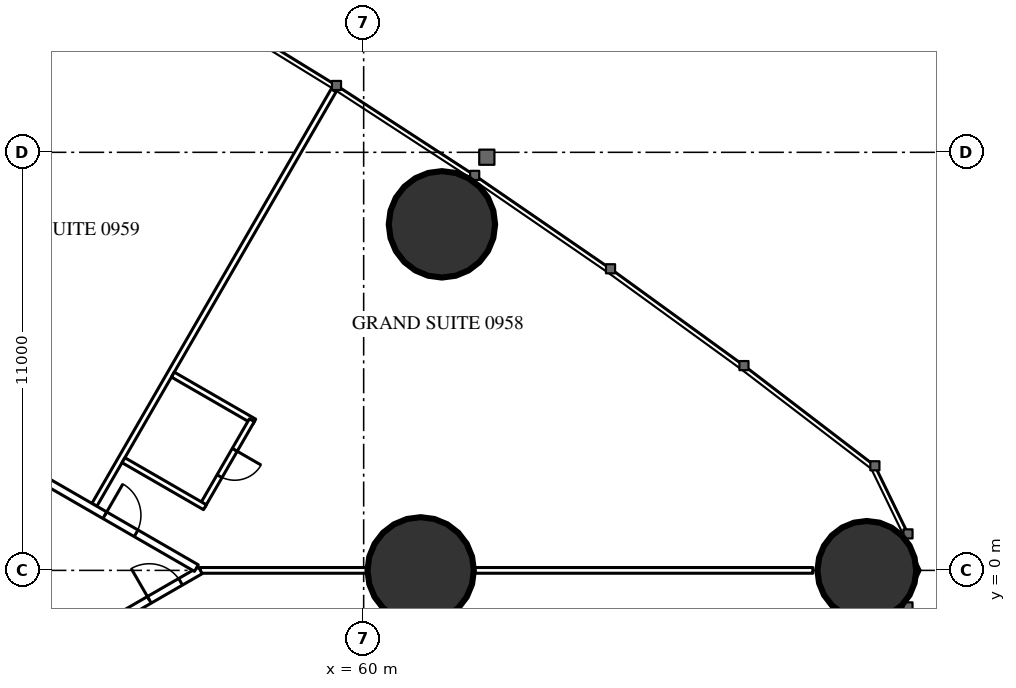
"""IFC4 building model, lengths in metres.
Left out: names, types, materials, properties, quantities, classifications, styles, units other than length and angle.
Written with IfcOpenShell. Run it as: python <this file> out.ifc"""

import sys

from ifc_helpers import new_model, si_unit, direction, frame, frame_2d, origin, origin_2d, place, context, subcontext, project, spatial, rectangle, hollow_circle, extrude, element, fill, save


model = new_model("IFC4")
c1 = context("Model", 3, precision=1e-05, world=origin(), true_north=direction((0.0, 1.0)))
c2 = subcontext(c1, "Body", "Model", "MODEL_VIEW")
j1 = project(units=[si_unit("LENGTHUNIT", "METRE"), si_unit("PLANEANGLEUNIT", "RADIAN")], contexts=[c1])
p1 = place(None, origin())
s1 = spatial("IfcSite", under=j1, at=p1, CompositionType="ELEMENT")
p2 = place(p1, origin())
s2 = spatial("IfcBuilding", under=s1, at=p2, CompositionType="ELEMENT")
p3 = place(p2, frame((0.0, 0.0, 39.0)))
s3 = spatial("IfcBuildingStorey", under=s2, at=p3, CompositionType="ELEMENT", Elevation=39.0)
p4 = place(p3, frame((73.239, 0.0, 0.0), z_axis=(0.0, 0.0, 1.0), x_axis=(1.0, 0.0, 0.0)))
e1 = element("IfcColumn", 1, at=p4, inside=s3, PredefinedType="COLUMN", context=c2, shape_type="SweptSolid", body=[
    extrude(hollow_circle(Radius=1.3, WallThickness=0.1, at=origin_2d()), origin(), (0.0, 0.0, 1.0), 3.5),
])
p5 = place(p3, frame((62.059, 9.105, 0.0), z_axis=(0.0, 0.0, 1.0), x_axis=(1.0, 0.0, 0.0)))
e2 = element("IfcColumn", 2, at=p5, inside=s3, PredefinedType="COLUMN", context=c2, shape_type="SweptSolid", body=[
    extrude(hollow_circle(Radius=1.4, WallThickness=0.12, at=origin_2d()), origin(), (0.0, 0.0, 1.0), 3.5),
])
p6 = place(p3, frame((61.5, 0.0, 0.0), z_axis=(0.0, 0.0, 1.0), x_axis=(1.0, 0.0, 0.0)))
e3 = element("IfcColumn", 3, at=p6, inside=s3, PredefinedType="COLUMN", context=c2, shape_type="SweptSolid", body=[
    extrude(hollow_circle(Radius=1.4, WallThickness=0.1, at=origin_2d()), origin(), (0.0, 0.0, 1.0), 3.5),
])
p7 = place(p3, frame((52.915, 1.725, 0.0), z_axis=(0.0, 0.0, 1.0), x_axis=(0.499997163113, 0.866027041656, 0.0)))
e4 = element("IfcWall", 4, at=p7, inside=s3, PredefinedType="PARTITIONING", context=c2, shape_type="SweptSolid", body=[
    extrude(rectangle(XDim=12.591, YDim=0.15, at=frame_2d((6.295, 0.0))), origin(), (0.0, 0.0, 1.0), 3.25),
])
p8 = place(p3, frame((55.702, 0.0, 0.0), z_axis=(0.0, 0.0, 1.0), x_axis=(1.0, 0.0, 0.0)))
e5 = element("IfcWall", 5, at=p8, inside=s3, PredefinedType="PARTITIONING", context=c2, shape_type="SweptSolid", body=[
    extrude(rectangle(XDim=16.117, YDim=0.15, at=frame_2d((8.059, 0.0))), origin(), (0.0, 0.0, 1.0), 2.25),
])
p9 = place(p3, frame((37.96, -10.243, 0.0), z_axis=(0.0, 0.0, 1.0), x_axis=(0.866026429433, 0.499998223521, 0.0)))
e6 = element("IfcWall", 6, at=p9, inside=s3, PredefinedType="PARTITIONING", context=c2, shape_type="SweptSolid", body=[
    extrude(rectangle(XDim=20.487, YDim=0.2, at=frame_2d((10.243, 0.0))), origin(), (0.0, 0.0, 1.0), 3.25),
])
p10 = place(p9, frame((7.325, 0.0, 0.0)))
e7 = element("IfcOpeningElement", 7, at=p10, cuts=e6, PredefinedType="OPENING", context=c2, shape_type="SweptSolid", body=[
    extrude(rectangle(XDim=1.0, YDim=2.2, at=frame_2d((0.5, 1.1))), frame((0.0, 0.11, 0.0), z_axis=(0.0, -1.0, 0.0), x_axis=(1.0, 0.0, 0.0)), (0.0, 0.0, 1.0), 0.22),
])
p11 = place(p9, frame((18.937, 0.0, 0.0)))
e8 = element("IfcOpeningElement", 8, at=p11, cuts=e6, PredefinedType="OPENING", context=c2, shape_type="SweptSolid", body=[
    extrude(rectangle(XDim=0.95, YDim=2.2, at=frame_2d((0.475, 1.1))), frame((0.0, 0.11, 0.0), z_axis=(0.0, -1.0, 0.0), x_axis=(1.0, 0.0, 0.0)), (0.0, 0.0, 1.0), 0.22),
])
p12 = place(p9, frame((0.6, 0.0, 0.0)))
e9 = element("IfcOpeningElement", 9, at=p12, cuts=e6, PredefinedType="OPENING", context=c2, shape_type="SweptSolid", body=[
    extrude(rectangle(XDim=0.95, YDim=2.2, at=frame_2d((0.475, 1.1))), frame((0.0, 0.11, 0.0), z_axis=(0.0, -1.0, 0.0), x_axis=(1.0, 0.0, 0.0)), (0.0, 0.0, 1.0), 0.22),
])
p13 = place(p3, frame((36.834, 10.894, 0.0), z_axis=(0.0, 0.0, 1.0), x_axis=(0.866028157229, -0.499995230863, 0.0)))
e10 = element("IfcWall", 10, at=p13, inside=s3, PredefinedType="PARTITIONING", context=c2, shape_type="SweptSolid", body=[
    extrude(rectangle(XDim=21.667, YDim=0.2, at=frame_2d((10.833, 0.0))), origin(), (0.0, 0.0, 1.0), 3.25),
])
p14 = place(p13, frame((18.885, 0.0, 0.0)))
e11 = element("IfcOpeningElement", 11, at=p14, cuts=e10, PredefinedType="OPENING", context=c2, shape_type="SweptSolid", body=[
    extrude(rectangle(XDim=0.95, YDim=2.2, at=frame_2d((0.475, 1.1))), frame((0.0, 0.11, 0.0), z_axis=(0.0, -1.0, 0.0), x_axis=(1.0, 0.0, 0.0)), (0.0, 0.0, 1.0), 0.22),
])
p15 = place(p13, frame((10.212, 0.0, 0.0)))
e12 = element("IfcOpeningElement", 12, at=p15, cuts=e10, PredefinedType="OPENING", context=c2, shape_type="SweptSolid", body=[
    extrude(rectangle(XDim=0.95, YDim=2.2, at=frame_2d((0.475, 1.1))), frame((0.0, 0.11, 0.0), z_axis=(0.0, -1.0, 0.0), x_axis=(1.0, 0.0, 0.0)), (0.0, 0.0, 1.0), 0.22),
])
p16 = place(p13, frame((8.225, 0.0, 0.0)))
e13 = element("IfcOpeningElement", 13, at=p16, cuts=e10, PredefinedType="OPENING", context=c2, shape_type="SweptSolid", body=[
    extrude(rectangle(XDim=0.95, YDim=2.2, at=frame_2d((0.475, 1.1))), frame((0.0, 0.11, 0.0), z_axis=(0.0, -1.0, 0.0), x_axis=(1.0, 0.0, 0.0)), (0.0, 0.0, 1.0), 0.22),
])
p17 = place(p13, frame((1.825, 0.0, 0.0)))
e14 = element("IfcOpeningElement", 14, at=p17, cuts=e10, PredefinedType="OPENING", context=c2, shape_type="SweptSolid", body=[
    extrude(rectangle(XDim=0.95, YDim=2.2, at=frame_2d((0.475, 1.1))), frame((0.0, 0.11, 0.0), z_axis=(0.0, -1.0, 0.0), x_axis=(1.0, 0.0, 0.0)), (0.0, 0.0, 1.0), 0.22),
])
p18 = place(p13, frame((0.246, 0.0, 0.0)))
e15 = element("IfcOpeningElement", 15, at=p18, cuts=e10, PredefinedType="OPENING", context=c2, shape_type="SweptSolid", body=[
    extrude(rectangle(XDim=0.9, YDim=2.2, at=frame_2d((0.45, 1.1))), frame((0.0, 0.11, 0.0), z_axis=(0.0, -1.0, 0.0), x_axis=(1.0, 0.0, 0.0)), (0.0, 0.0, 1.0), 0.22),
])
p19 = place(p3, frame((54.98, 5.151, 0.0), z_axis=(0.0, 0.0, 1.0), x_axis=(0.86604923931, -0.499958713387, 0.0)))
e16 = element("IfcWall", 16, at=p19, inside=s3, PredefinedType="PARTITIONING", context=c2, shape_type="SweptSolid", body=[
    extrude(rectangle(XDim=2.475, YDim=0.15, at=frame_2d((1.237, 0.0))), origin(), (0.0, 0.0, 1.0), 3.25),
])
p20 = place(p3, frame((55.758, 1.7, 0.0), z_axis=(0.0, 0.0, 1.0), x_axis=(0.500006934395, 0.866021400173, 0.0)))
e17 = element("IfcWall", 17, at=p20, inside=s3, PredefinedType="PARTITIONING", context=c2, shape_type="SweptSolid", body=[
    extrude(rectangle(XDim=2.6, YDim=0.15, at=frame_2d((1.3, 0.0))), origin(), (0.0, 0.0, 1.0), 3.25),
])
p21 = place(p20, frame((0.9, 0.0, 0.0)))
e18 = element("IfcOpeningElement", 18, at=p21, cuts=e17, PredefinedType="OPENING", context=c2, shape_type="SweptSolid", body=[
    extrude(rectangle(XDim=0.8, YDim=2.2, at=frame_2d((0.4, 1.1))), frame((0.0, 0.085, 0.0), z_axis=(0.0, -1.0, 0.0), x_axis=(1.0, 0.0, 0.0)), (0.0, 0.0, 1.0), 0.17),
])
p22 = place(p3, frame((53.68, 2.9, 0.0), z_axis=(0.0, 0.0, 1.0), x_axis=(0.866006523861, -0.500032699561, 0.0)))
e19 = element("IfcWall", 19, at=p22, inside=s3, PredefinedType="PARTITIONING", context=c2, shape_type="SweptSolid", body=[
    extrude(rectangle(XDim=2.475, YDim=0.15, at=frame_2d((1.237, 0.0))), origin(), (0.0, 0.0, 1.0), 3.25),
])
p23 = place(p11, origin())
e20 = element("IfcDoor", 20, at=p23, inside=s3, OperationType="SINGLE_SWING_LEFT", PredefinedType="DOOR", context=c2, shape_type="SweptSolid", body=[
    extrude(rectangle(XDim=0.95, YDim=2.2, at=frame_2d((0.475, 1.1))), frame((0.0, 0.025, 0.0), z_axis=(0.0, -1.0, 0.0), x_axis=(1.0, 0.0, 0.0)), (0.0, 0.0, 1.0), 0.05),
])
fill(e8, e20)
p24 = place(p21, origin())
e21 = element("IfcDoor", 21, at=p24, inside=s3, OperationType="SINGLE_SWING_RIGHT", PredefinedType="DOOR", context=c2, shape_type="SweptSolid", body=[
    extrude(rectangle(XDim=0.8, YDim=2.2, at=frame_2d((0.4, 1.1))), frame((0.0, 0.025, 0.0), z_axis=(0.0, -1.0, 0.0), x_axis=(1.0, 0.0, 0.0)), (0.0, 0.0, 1.0), 0.05),
])
fill(e18, e21)
p25 = place(p14, origin())
e22 = element("IfcDoor", 22, at=p25, inside=s3, OperationType="SINGLE_SWING_LEFT", PredefinedType="DOOR", context=c2, shape_type="SweptSolid", body=[
    extrude(rectangle(XDim=0.95, YDim=2.2, at=frame_2d((0.475, 1.1))), frame((0.0, 0.025, 0.0), z_axis=(0.0, -1.0, 0.0), x_axis=(1.0, 0.0, 0.0)), (0.0, 0.0, 1.0), 0.05),
])
fill(e11, e22)
save(model, sys.argv[1])
